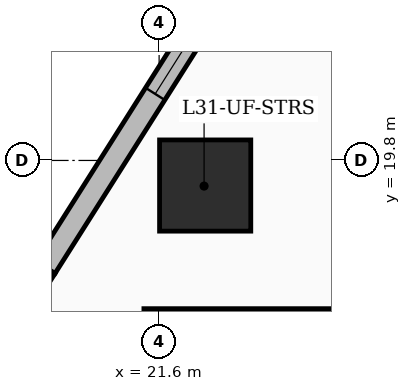
"""IFC4 building model, lengths in metres.
Left out: names, types, materials, properties, quantities, classifications, styles, units other than length and angle.
Written with IfcOpenShell. Run it as: python <this file> out.ifc"""

import sys

from ifc_helpers import new_model, si_unit, direction, frame, frame_2d, origin, origin_2d, place, context, subcontext, project, spatial, rectangle, extrude, element, fill, save


model = new_model("IFC4")
c1 = context("Model", 3, precision=1e-05, world=origin(), true_north=direction((0.0, 1.0)))
c2 = subcontext(c1, "Body", "Model", "MODEL_VIEW")
j1 = project(units=[si_unit("LENGTHUNIT", "METRE"), si_unit("PLANEANGLEUNIT", "RADIAN")], contexts=[c1])
p1 = place(None, origin())
s1 = spatial("IfcSite", under=j1, at=p1, CompositionType="ELEMENT")
p2 = place(p1, origin())
s2 = spatial("IfcBuilding", under=s1, at=p2, CompositionType="ELEMENT")
p3 = place(p2, frame((0.0, 0.0, 124.8)))
s3 = spatial("IfcBuildingStorey", under=s2, at=p3, CompositionType="ELEMENT", Elevation=124.8)
p4 = place(p3, frame((22.206, 19.47, 0.0), z_axis=(0.0, 0.0, 1.0), x_axis=(1.0, 0.0, 0.0)))
e1 = element("IfcColumn", 1, at=p4, inside=s3, PredefinedType="COLUMN", context=c2, shape_type="SweptSolid", body=[
    extrude(rectangle(XDim=1.2, YDim=1.2, at=origin_2d()), origin(), (0.0, 0.0, 1.0), 3.6),
])
p5 = place(p3, frame((15.884, 11.728, 0.0), z_axis=(0.0, 0.0, 1.0), x_axis=(0.534871703897, 0.844933287527, 0.0)))
e2 = element("IfcWall", 2, at=p5, inside=s3, PredefinedType="SOLIDWALL", context=c2, shape_type="SweptSolid", body=[
    extrude(rectangle(XDim=7.89, YDim=0.3, at=frame_2d((3.945, 0.0))), origin(), (0.0, 0.0, 1.0), 3.35),
])
p6 = place(p5, frame((3.675, 0.0, 0.8)))
e3 = element("IfcOpeningElement", 3, at=p6, cuts=e2, PredefinedType="OPENING", context=c2, shape_type="SweptSolid", body=[
    extrude(rectangle(XDim=1.2, YDim=1.8, at=frame_2d((0.6, 0.9))), frame((0.0, 0.16, 0.0), z_axis=(0.0, -1.0, 0.0), x_axis=(1.0, 0.0, 0.0)), (0.0, 0.0, 1.0), 0.32),
])
p7 = place(p5, frame((0.675, 0.0, 0.8)))
e4 = element("IfcOpeningElement", 4, at=p7, cuts=e2, PredefinedType="OPENING", context=c2, shape_type="SweptSolid", body=[
    extrude(rectangle(XDim=1.2, YDim=1.8, at=frame_2d((0.6, 0.9))), frame((0.0, 0.16, 0.0), z_axis=(0.0, -1.0, 0.0), x_axis=(1.0, 0.0, 0.0)), (0.0, 0.0, 1.0), 0.32),
])
p8 = place(p3, frame((20.104, 18.394, 0.0), z_axis=(0.0, 0.0, 1.0), x_axis=(0.534858194294, 0.844941839417, 0.0)))
e5 = element("IfcWall", 5, at=p8, inside=s3, PredefinedType="SOLIDWALL", context=c2, shape_type="SweptSolid", body=[
    extrude(rectangle(XDim=7.61, YDim=0.3, at=frame_2d((3.805, 0.0))), origin(), (0.0, 0.0, 1.0), 3.35),
])
p9 = place(p8, frame((2.7, 0.0, 0.6)))
e6 = element("IfcOpeningElement", 6, at=p9, cuts=e5, PredefinedType="OPENING", context=c2, shape_type="SweptSolid", body=[
    extrude(rectangle(XDim=2.4, YDim=2.1, at=frame_2d((1.2, 1.05))), frame((0.0, 0.16, 0.0), z_axis=(0.0, -1.0, 0.0), x_axis=(1.0, 0.0, 0.0)), (0.0, 0.0, 1.0), 0.32),
])
p10 = place(p3, frame((26.39, 17.75, 0.0), z_axis=(0.0, 0.0, 1.0), x_axis=(-1.0, 0.0, 0.0)))
e7 = element("IfcWall", 7, at=p10, inside=s3, PredefinedType="PARTITIONING", context=c2, shape_type="SweptSolid", body=[
    extrude(rectangle(XDim=4.99, YDim=0.2, at=frame_2d((2.495, 0.0))), origin(), (0.0, 0.0, 1.0), 2.372),
])
p11 = place(p9, origin())
e8 = element("IfcWindow", 8, at=p11, inside=s3, PartitioningType="SINGLE_PANEL", PredefinedType="WINDOW", context=c2, shape_type="SweptSolid", body=[
    extrude(rectangle(XDim=2.4, YDim=2.1, at=frame_2d((1.2, 1.05))), frame((0.0, 0.03, 0.0), z_axis=(0.0, -1.0, 0.0), x_axis=(1.0, 0.0, 0.0)), (0.0, 0.0, 1.0), 0.06),
])
fill(e6, e8)
save(model, sys.argv[1])
